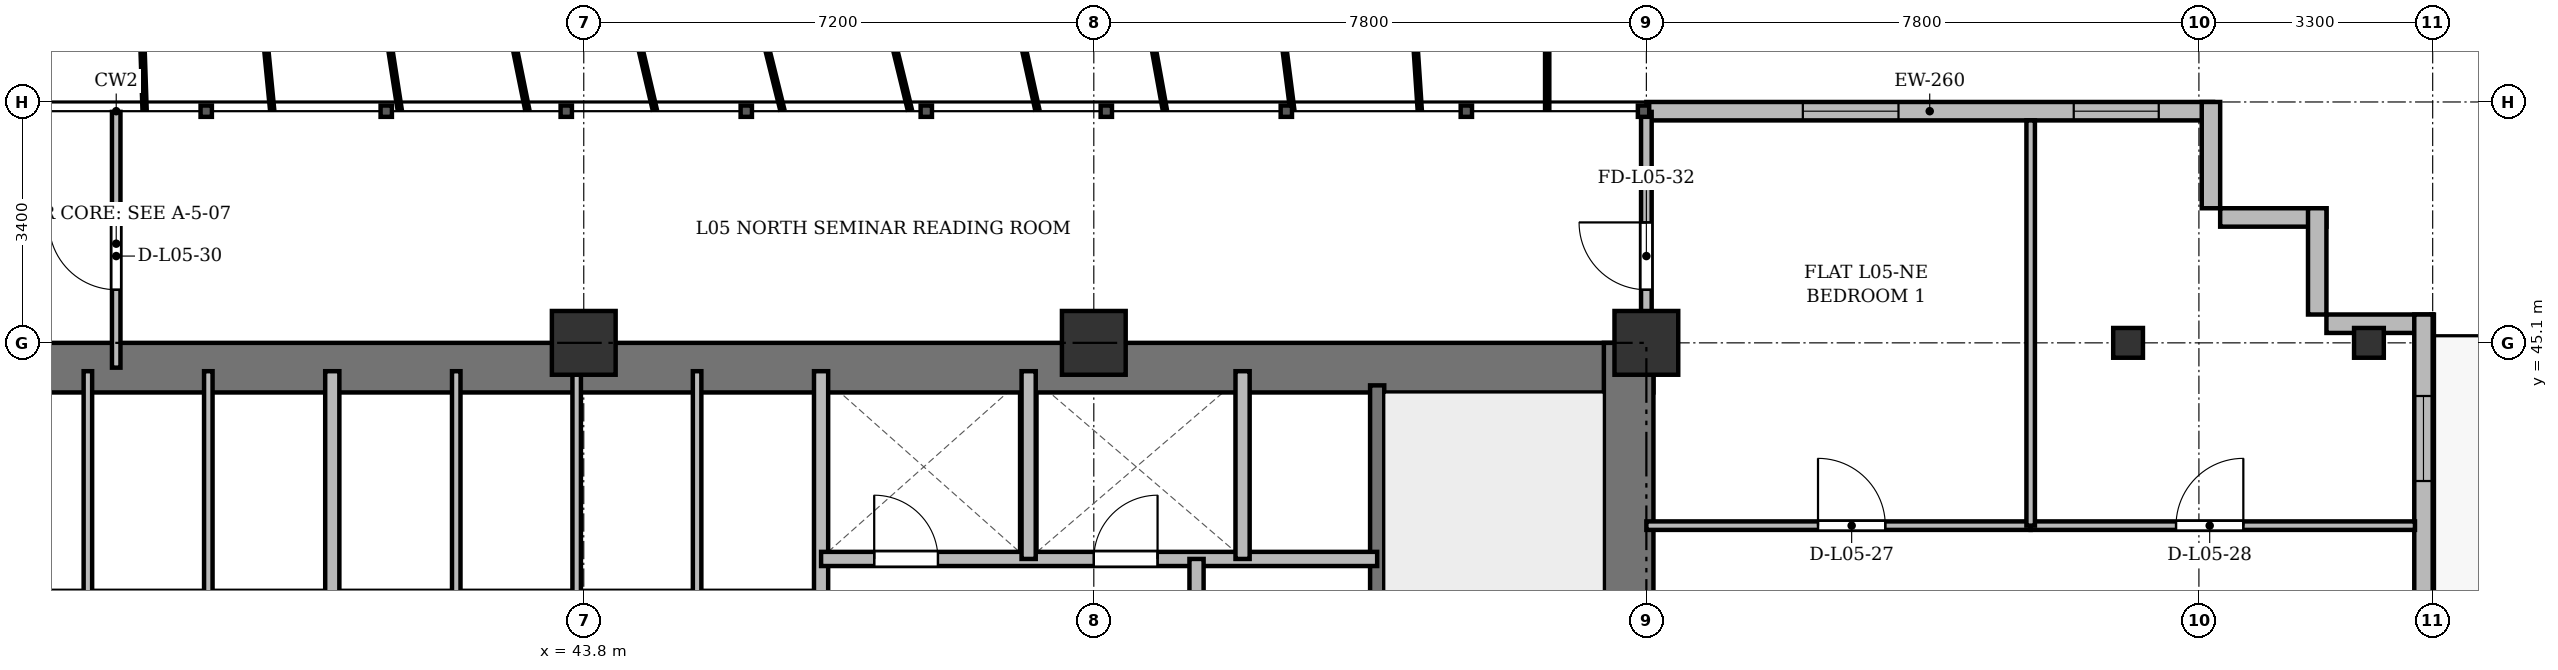
"""IFC4 building model, lengths in metres.
Left out: names, types, materials, properties, quantities, classifications, styles, units other than length and angle.
Written with IfcOpenShell. Run it as: python <this file> out.ifc"""

import sys

from ifc_helpers import new_model, si_unit, direction, frame, frame_2d, origin, origin_2d, place, context, subcontext, project, spatial, rectangle, i_section, extrude, source, transform, mapped, element, fill, save


model = new_model("IFC4")
c1 = context("Model", 3, precision=1e-05, world=origin(), true_north=direction((0.0, 1.0)))
c2 = subcontext(c1, "Body", "Model", "MODEL_VIEW")
j1 = project(units=[si_unit("LENGTHUNIT", "METRE"), si_unit("PLANEANGLEUNIT", "RADIAN")], contexts=[c1])
p1 = place(None, origin())
s1 = spatial("IfcSite", under=j1, at=p1, CompositionType="ELEMENT")
p2 = place(p1, origin())
s2 = spatial("IfcBuilding", under=s1, at=p2, CompositionType="ELEMENT")
p3 = place(p2, frame((0.0, 0.0, 23.5)))
s3 = spatial("IfcBuildingStorey", under=s2, at=p3, CompositionType="ELEMENT", Elevation=23.5)
m1 = source(origin(), c2, "Body", "SweptSolid", [
    extrude(rectangle(XDim=0.9, YDim=0.9, at=origin_2d()), origin(), (0.0, 0.0, 1.0), 3.6),
])
for number, where, z_axis, x_axis in (
    (1, (43.8, 45.1, 0.0), (0.0, 0.0, 1.0), (1.0, 0.0, 0.0)),
    (2, (51.0, 45.1, 0.0), (0.0, 0.0, 1.0), (1.0, 0.0, 0.0)),
    (3, (58.8, 45.1, 0.0), (0.0, 0.0, 1.0), (1.0, 0.0, 0.0)),
):
    element("IfcColumn", number, at=place(p3, frame(where, z_axis=z_axis, x_axis=x_axis)), inside=s3, PredefinedType="COLUMN", context=c2, shape_type="MappedRepresentation", body=[
        mapped(m1, transform((0.0, 0.0, 0.0), x_axis=(1.0, 0.0, 0.0), y_axis=(0.0, 1.0, 0.0), z_axis=(0.0, 0.0, 1.0), scale=1.0)),
    ])
m2 = source(origin(), c2, "Body", "SweptSolid", [
    extrude(i_section(OverallWidth=0.42, OverallDepth=0.42, WebThickness=0.026, FlangeThickness=0.04, at=origin_2d()), origin(), (0.0, 0.0, 1.0), 3.6),
])
for number, where, z_axis, x_axis in (
    (4, (65.6, 45.1, 0.0), (0.0, 0.0, 1.0), (1.0, 0.0, 0.0)),
    (5, (69.0, 45.1, 0.0), (0.0, 0.0, 1.0), (1.0, 0.0, 0.0)),
):
    element("IfcColumn", number, at=place(p3, frame(where, z_axis=z_axis, x_axis=x_axis)), inside=s3, PredefinedType="COLUMN", context=c2, shape_type="MappedRepresentation", body=[
        mapped(m2, transform((0.0, 0.0, 0.0), x_axis=(1.0, 0.0, 0.0), y_axis=(0.0, 1.0, 0.0), z_axis=(0.0, 0.0, 1.0), scale=1.0)),
    ])
p4 = place(p3, frame((58.8, 48.37, 0.0), z_axis=(0.0, 0.0, 1.0), x_axis=(1.0, 0.0, 0.0)))
e6 = element("IfcWall", 6, at=p4, inside=s3, PredefinedType="SOLIDWALL", context=c2, shape_type="SweptSolid", body=[
    extrude(rectangle(XDim=8.0, YDim=0.26, at=frame_2d((4.0, 0.0))), origin(), (0.0, 0.0, 1.0), 3.34),
])
p5 = place(p4, frame((2.209, 0.0, 0.9)))
e7 = element("IfcOpeningElement", 7, at=p5, cuts=e6, PredefinedType="OPENING", context=c2, shape_type="SweptSolid", body=[
    extrude(rectangle(XDim=1.35, YDim=1.5, at=frame_2d((0.675, 0.75))), frame((0.0, 0.14, 0.0), z_axis=(0.0, -1.0, 0.0), x_axis=(1.0, 0.0, 0.0)), (0.0, 0.0, 1.0), 0.28),
])
p6 = place(p4, frame((6.033, 0.0, 0.9)))
e8 = element("IfcOpeningElement", 8, at=p6, cuts=e6, PredefinedType="OPENING", context=c2, shape_type="SweptSolid", body=[
    extrude(rectangle(XDim=1.2, YDim=1.65, at=frame_2d((0.6, 0.825))), frame((0.0, 0.14, 0.0), z_axis=(0.0, -1.0, 0.0), x_axis=(1.0, 0.0, 0.0)), (0.0, 0.0, 1.0), 0.28),
])
for number, where, z_axis, x_axis in (
    (9, (66.77, 48.5, 0.0), (0.0, 0.0, 1.0), (0.0, -1.0, 0.0)),
    (10, (66.9, 46.87, 0.0), (0.0, 0.0, 1.0), (1.0, 0.0, 0.0)),
    (11, (68.27, 47.0, 0.0), (0.0, 0.0, 1.0), (0.0, -1.0, 0.0)),
):
    element("IfcWall", number, at=place(p3, frame(where, z_axis=z_axis, x_axis=x_axis)), inside=s3, PredefinedType="SOLIDWALL", context=c2, shape_type="SweptSolid", body=[
        extrude(rectangle(XDim=1.5, YDim=0.26, at=frame_2d((0.75, 0.0))), origin(), (0.0, 0.0, 1.0), 3.34),
    ])
p7 = place(p3, frame((68.4, 45.37, 0.0), z_axis=(0.0, 0.0, 1.0), x_axis=(1.0, 0.0, 0.0)))
e12 = element("IfcWall", 12, at=p7, inside=s3, PredefinedType="SOLIDWALL", context=c2, shape_type="SweptSolid", body=[
    extrude(rectangle(XDim=1.5, YDim=0.26, at=frame_2d((0.75, 0.0))), origin(), (0.0, 0.0, 1.0), 2.69),
])
p8 = place(p3, frame((69.77, 45.5, 0.0), z_axis=(0.0, 0.0, 1.0), x_axis=(0.0, -1.0, 0.0)))
e13 = element("IfcWall", 13, at=p8, inside=s3, PredefinedType="SOLIDWALL", context=c2, shape_type="SweptSolid", body=[
    extrude(rectangle(XDim=39.6, YDim=0.26, at=frame_2d((19.8, 0.0))), origin(), (0.0, 0.0, 1.0), 3.34),
])
p9 = place(p8, frame((9.745, 0.0, 0.0)))
e14 = element("IfcOpeningElement", 14, at=p9, cuts=e13, PredefinedType="OPENING", context=c2, shape_type="SweptSolid", body=[
    extrude(rectangle(XDim=1.2, YDim=2.2, at=frame_2d((0.6, 1.1))), frame((0.0, 0.14, 0.0), z_axis=(0.0, -1.0, 0.0), x_axis=(1.0, 0.0, 0.0)), (0.0, 0.0, 1.0), 0.28),
])
p10 = place(p8, frame((36.95, 0.0, 0.92)))
e15 = element("IfcOpeningElement", 15, at=p10, cuts=e13, PredefinedType="OPENING", context=c2, shape_type="SweptSolid", body=[
    extrude(rectangle(XDim=1.2, YDim=1.65, at=frame_2d((0.6, 0.825))), frame((0.0, 0.14, 0.0), z_axis=(0.0, -1.0, 0.0), x_axis=(1.0, 0.0, 0.0)), (0.0, 0.0, 1.0), 0.28),
])
p11 = place(p8, frame((32.9, 0.0, 0.92)))
e16 = element("IfcOpeningElement", 16, at=p11, cuts=e13, PredefinedType="OPENING", context=c2, shape_type="SweptSolid", body=[
    extrude(rectangle(XDim=2.4, YDim=2.1, at=frame_2d((1.2, 1.05))), frame((0.0, 0.14, 0.0), z_axis=(0.0, -1.0, 0.0), x_axis=(1.0, 0.0, 0.0)), (0.0, 0.0, 1.0), 0.28),
])
p12 = place(p8, frame((28.7, 0.0, 0.92)))
e17 = element("IfcOpeningElement", 17, at=p12, cuts=e13, PredefinedType="OPENING", context=c2, shape_type="SweptSolid", body=[
    extrude(rectangle(XDim=2.4, YDim=2.1, at=frame_2d((1.2, 1.05))), frame((0.0, 0.14, 0.0), z_axis=(0.0, -1.0, 0.0), x_axis=(1.0, 0.0, 0.0)), (0.0, 0.0, 1.0), 0.28),
])
p13 = place(p8, frame((4.5, 0.0, 0.92)))
e18 = element("IfcOpeningElement", 18, at=p13, cuts=e13, PredefinedType="OPENING", context=c2, shape_type="SweptSolid", body=[
    extrude(rectangle(XDim=1.2, YDim=1.65, at=frame_2d((0.6, 0.825))), frame((0.0, 0.14, 0.0), z_axis=(0.0, -1.0, 0.0), x_axis=(1.0, 0.0, 0.0)), (0.0, 0.0, 1.0), 0.28),
])
p14 = place(p8, frame((1.15, 0.0, 0.92)))
e19 = element("IfcOpeningElement", 19, at=p14, cuts=e13, PredefinedType="OPENING", context=c2, shape_type="SweptSolid", body=[
    extrude(rectangle(XDim=1.2, YDim=1.65, at=frame_2d((0.6, 0.825))), frame((0.0, 0.14, 0.0), z_axis=(0.0, -1.0, 0.0), x_axis=(1.0, 0.0, 0.0)), (0.0, 0.0, 1.0), 0.28),
])
p15 = place(p3, frame((15.5, 44.75, 0.0), z_axis=(0.0, 0.0, 1.0), x_axis=(1.0, 0.0, 0.0)))
e20 = element("IfcWall", 20, at=p15, inside=s3, PredefinedType="SHEAR", context=c2, shape_type="SweptSolid", body=[
    extrude(rectangle(XDim=43.4, YDim=0.7, at=frame_2d((21.7, 0.0))), origin(), (0.0, 0.0, 1.0), 3.34),
])
p16 = place(p3, frame((58.55, 33.4, 0.0), z_axis=(0.0, 0.0, 1.0), x_axis=(0.0, 1.0, 0.0)))
e21 = element("IfcWall", 21, at=p16, inside=s3, PredefinedType="SHEAR", context=c2, shape_type="SweptSolid", body=[
    extrude(rectangle(XDim=11.7, YDim=0.7, at=frame_2d((5.85, 0.0))), origin(), (0.0, 0.0, 1.0), 3.34),
])
p17 = place(p3, frame((55.0, 33.4, 0.0), z_axis=(0.0, 0.0, 1.0), x_axis=(0.0, 1.0, 0.0)))
e22 = element("IfcWall", 22, at=p17, inside=s3, PredefinedType="SHEAR", context=c2, shape_type="SweptSolid", body=[
    extrude(rectangle(XDim=11.1, YDim=0.2, at=frame_2d((5.55, 0.0))), origin(), (0.0, 0.0, 1.0), 3.34),
])
p18 = place(p17, frame((0.85, 0.0, 0.0)))
e23 = element("IfcOpeningElement", 23, at=p18, cuts=e22, PredefinedType="OPENING", context=c2, shape_type="SweptSolid", body=[
    extrude(rectangle(XDim=1.1, YDim=2.15, at=frame_2d((0.55, 1.075))), frame((0.0, 0.11, 0.0), z_axis=(0.0, -1.0, 0.0), x_axis=(1.0, 0.0, 0.0)), (0.0, 0.0, 1.0), 0.22),
])
for number, where, z_axis, x_axis in (
    (24, (36.8, 41.5, 0.0), (0.0, 0.0, 1.0), (0.0, 1.0, 0.0)),
    (25, (38.5, 41.5, 0.0), (0.0, 0.0, 1.0), (0.0, 1.0, 0.0)),
):
    element("IfcWall", number, at=place(p3, frame(where, z_axis=z_axis, x_axis=x_axis)), inside=s3, PredefinedType="PARTITIONING", context=c2, shape_type="SweptSolid", body=[
        extrude(rectangle(XDim=3.2, YDim=0.12, at=frame_2d((1.6, 0.0))), origin(), (0.0, 0.0, 1.0), 3.34),
    ])
p19 = place(p3, frame((40.25, 41.5, 0.0), z_axis=(0.0, 0.0, 1.0), x_axis=(0.0, 1.0, 0.0)))
e26 = element("IfcWall", 26, at=p19, inside=s3, PredefinedType="SOLIDWALL", context=c2, shape_type="SweptSolid", body=[
    extrude(rectangle(XDim=3.2, YDim=0.2, at=frame_2d((1.6, 0.0))), origin(), (0.0, 0.0, 1.0), 3.34),
])
p20 = place(p3, frame((42.0, 41.5, 0.0), z_axis=(0.0, 0.0, 1.0), x_axis=(0.0, 1.0, 0.0)))
e27 = element("IfcWall", 27, at=p20, inside=s3, PredefinedType="PARTITIONING", context=c2, shape_type="SweptSolid", body=[
    extrude(rectangle(XDim=3.2, YDim=0.12, at=frame_2d((1.6, 0.0))), origin(), (0.0, 0.0, 1.0), 3.34),
])
p21 = place(p3, frame((43.7, 41.5, 0.0), z_axis=(0.0, 0.0, 1.0), x_axis=(0.0, 1.0, 0.0)))
e28 = element("IfcWall", 28, at=p21, inside=s3, PredefinedType="PARTITIONING", context=c2, shape_type="SweptSolid", body=[
    extrude(rectangle(XDim=3.2, YDim=0.12, at=frame_2d((1.6, 0.0))), origin(), (0.0, 0.0, 1.0), 2.752),
])
p22 = place(p3, frame((45.4, 41.5, 0.0), z_axis=(0.0, 0.0, 1.0), x_axis=(0.0, 1.0, 0.0)))
e29 = element("IfcWall", 29, at=p22, inside=s3, PredefinedType="PARTITIONING", context=c2, shape_type="SweptSolid", body=[
    extrude(rectangle(XDim=3.2, YDim=0.12, at=frame_2d((1.6, 0.0))), origin(), (0.0, 0.0, 1.0), 3.34),
])
p23 = place(p3, frame((47.15, 33.4, 0.0), z_axis=(0.0, 0.0, 1.0), x_axis=(0.0, 1.0, 0.0)))
e30 = element("IfcWall", 30, at=p23, inside=s3, PredefinedType="SOLIDWALL", context=c2, shape_type="SweptSolid", body=[
    extrude(rectangle(XDim=11.3, YDim=0.2, at=frame_2d((5.65, 0.0))), origin(), (0.0, 0.0, 1.0), 2.69),
])
p24 = place(p3, frame((47.15, 42.05, 0.0), z_axis=(0.0, 0.0, 1.0), x_axis=(1.0, 0.0, 0.0)))
e31 = element("IfcWall", 31, at=p24, inside=s3, PredefinedType="SOLIDWALL", context=c2, shape_type="SweptSolid", body=[
    extrude(rectangle(XDim=7.85, YDim=0.2, at=frame_2d((3.925, 0.0))), origin(), (0.0, 0.0, 1.0), 2.752),
])
p25 = place(p24, frame((0.75, 0.0, 0.0)))
e32 = element("IfcOpeningElement", 32, at=p25, cuts=e31, PredefinedType="OPENING", context=c2, shape_type="SweptSolid", body=[
    extrude(rectangle(XDim=0.9, YDim=2.1, at=frame_2d((0.45, 1.05))), frame((0.0, 0.11, 0.0), z_axis=(0.0, -1.0, 0.0), x_axis=(1.0, 0.0, 0.0)), (0.0, 0.0, 1.0), 0.22),
])
p26 = place(p24, frame((3.85, 0.0, 0.0)))
e33 = element("IfcOpeningElement", 33, at=p26, cuts=e31, PredefinedType="OPENING", context=c2, shape_type="SweptSolid", body=[
    extrude(rectangle(XDim=0.9, YDim=2.1, at=frame_2d((0.45, 1.05))), frame((0.0, 0.11, 0.0), z_axis=(0.0, -1.0, 0.0), x_axis=(1.0, 0.0, 0.0)), (0.0, 0.0, 1.0), 0.22),
])
for number, where, z_axis, x_axis in (
    (34, (50.08, 42.05, 0.0), (0.0, 0.0, 1.0), (0.0, 1.0, 0.0)),
    (35, (53.1, 42.05, 0.0), (0.0, 0.0, 1.0), (0.0, 1.0, 0.0)),
):
    element("IfcWall", number, at=place(p3, frame(where, z_axis=z_axis, x_axis=x_axis)), inside=s3, PredefinedType="SOLIDWALL", context=c2, shape_type="SweptSolid", body=[
        extrude(rectangle(XDim=2.65, YDim=0.2, at=frame_2d((1.325, 0.0))), origin(), (0.0, 0.0, 1.0), 3.34),
    ])
p27 = place(p3, frame((52.45, 33.4, 0.0), z_axis=(0.0, 0.0, 1.0), x_axis=(0.0, 1.0, 0.0)))
e36 = element("IfcWall", 36, at=p27, inside=s3, PredefinedType="PARTITIONING", context=c2, shape_type="SweptSolid", body=[
    extrude(rectangle(XDim=8.65, YDim=0.2, at=frame_2d((4.325, 0.0))), origin(), (0.0, 0.0, 1.0), 2.69),
])
p28 = place(p27, frame((6.2, 0.0, 0.0)))
e37 = element("IfcOpeningElement", 37, at=p28, cuts=e36, PredefinedType="OPENING", context=c2, shape_type="SweptSolid", body=[
    extrude(rectangle(XDim=0.95, YDim=2.15, at=frame_2d((0.475, 1.075))), frame((0.0, 0.11, 0.0), z_axis=(0.0, -1.0, 0.0), x_axis=(1.0, 0.0, 0.0)), (0.0, 0.0, 1.0), 0.22),
])
p29 = place(p3, frame((58.8, 42.52, 0.0), z_axis=(0.0, 0.0, 1.0), x_axis=(1.0, 0.0, 0.0)))
e38 = element("IfcWall", 38, at=p29, inside=s3, PredefinedType="PARTITIONING", context=c2, shape_type="SweptSolid", body=[
    extrude(rectangle(XDim=5.425, YDim=0.12, at=frame_2d((2.712, 0.0))), origin(), (0.0, 0.0, 1.0), 2.752),
])
p30 = place(p29, frame((2.423, 0.0, 0.0)))
e39 = element("IfcOpeningElement", 39, at=p30, cuts=e38, PredefinedType="OPENING", context=c2, shape_type="SweptSolid", body=[
    extrude(rectangle(XDim=0.95, YDim=2.15, at=frame_2d((0.475, 1.075))), frame((0.0, 0.07, 0.0), z_axis=(0.0, -1.0, 0.0), x_axis=(1.0, 0.0, 0.0)), (0.0, 0.0, 1.0), 0.14),
])
p31 = place(p3, frame((64.225, 42.52, 0.0), z_axis=(0.0, 0.0, 1.0), x_axis=(1.0, 0.0, 0.0)))
e40 = element("IfcWall", 40, at=p31, inside=s3, PredefinedType="PARTITIONING", context=c2, shape_type="SweptSolid", body=[
    extrude(rectangle(XDim=5.425, YDim=0.12, at=frame_2d((2.712, 0.0))), origin(), (0.0, 0.0, 1.0), 2.752),
])
p32 = place(p31, frame((2.052, 0.0, 0.0)))
e41 = element("IfcOpeningElement", 41, at=p32, cuts=e40, PredefinedType="OPENING", context=c2, shape_type="SweptSolid", body=[
    extrude(rectangle(XDim=0.95, YDim=2.15, at=frame_2d((0.475, 1.075))), frame((0.0, 0.07, 0.0), z_axis=(0.0, -1.0, 0.0), x_axis=(1.0, 0.0, 0.0)), (0.0, 0.0, 1.0), 0.14),
])
p33 = place(p3, frame((64.225, 42.52, 0.0), z_axis=(0.0, 0.0, 1.0), x_axis=(0.0, 1.0, 0.0)))
e42 = element("IfcWall", 42, at=p33, inside=s3, PredefinedType="PARTITIONING", context=c2, shape_type="SweptSolid", body=[
    extrude(rectangle(XDim=5.72, YDim=0.12, at=frame_2d((2.86, 0.0))), origin(), (0.0, 0.0, 1.0), 2.69),
])
p34 = place(p3, frame((37.2, 44.75, 0.0), z_axis=(0.0, 0.0, 1.0), x_axis=(0.0, 1.0, 0.0)))
e43 = element("IfcWall", 43, at=p34, inside=s3, PredefinedType="PARTITIONING", context=c2, shape_type="SweptSolid", body=[
    extrude(rectangle(XDim=3.61, YDim=0.12, at=frame_2d((1.805, 0.0))), origin(), (0.0, 0.0, 1.0), 2.69),
])
p35 = place(p34, frame((1.1, 0.0, 0.0)))
e44 = element("IfcOpeningElement", 44, at=p35, cuts=e43, PredefinedType="OPENING", context=c2, shape_type="SweptSolid", body=[
    extrude(rectangle(XDim=0.95, YDim=2.15, at=frame_2d((0.475, 1.075))), frame((0.0, 0.07, 0.0), z_axis=(0.0, -1.0, 0.0), x_axis=(1.0, 0.0, 0.0)), (0.0, 0.0, 1.0), 0.14),
])
p36 = place(p3, frame((58.8, 44.75, 0.0), z_axis=(0.0, 0.0, 1.0), x_axis=(0.0, 1.0, 0.0)))
e45 = element("IfcWall", 45, at=p36, inside=s3, PredefinedType="PARTITIONING", context=c2, shape_type="SweptSolid", body=[
    extrude(rectangle(XDim=3.61, YDim=0.15, at=frame_2d((1.805, 0.0))), origin(), (0.0, 0.0, 1.0), 2.752),
])
p37 = place(p36, frame((1.1, 0.0, 0.0)))
e46 = element("IfcOpeningElement", 46, at=p37, cuts=e45, PredefinedType="OPENING", context=c2, shape_type="SweptSolid", body=[
    extrude(rectangle(XDim=0.95, YDim=2.15, at=frame_2d((0.475, 1.075))), frame((0.0, 0.085, 0.0), z_axis=(0.0, -1.0, 0.0), x_axis=(1.0, 0.0, 0.0)), (0.0, 0.0, 1.0), 0.17),
])
m3 = source(origin(), c2, "Body", "SweptSolid", [
    extrude(rectangle(XDim=1.35, YDim=1.5, at=frame_2d((0.675, 0.75))), frame((0.0, 0.03, 0.0), z_axis=(0.0, -1.0, 0.0), x_axis=(1.0, 0.0, 0.0)), (0.0, 0.0, 1.0), 0.06),
])
p38 = place(p5, origin())
e47 = element("IfcWindow", 47, at=p38, inside=s3, PartitioningType="SINGLE_PANEL", PredefinedType="WINDOW", context=c2, shape_type="MappedRepresentation", body=[
    mapped(m3, transform((0.0, 0.0, 0.0), x_axis=(1.0, 0.0, 0.0), y_axis=(0.0, 1.0, 0.0), z_axis=(0.0, 0.0, 1.0), scale=1.0)),
])
fill(e7, e47)
m4 = source(origin(), c2, "Body", "SweptSolid", [
    extrude(rectangle(XDim=1.2, YDim=1.65, at=frame_2d((0.6, 0.825))), frame((0.0, 0.03, 0.0), z_axis=(0.0, -1.0, 0.0), x_axis=(1.0, 0.0, 0.0)), (0.0, 0.0, 1.0), 0.06),
])
p39 = place(p6, origin())
e48 = element("IfcWindow", 48, at=p39, inside=s3, PartitioningType="SINGLE_PANEL", PredefinedType="WINDOW", context=c2, shape_type="MappedRepresentation", body=[
    mapped(m4, transform((0.0, 0.0, 0.0), x_axis=(1.0, 0.0, 0.0), y_axis=(0.0, 1.0, 0.0), z_axis=(0.0, 0.0, 1.0), scale=1.0)),
])
fill(e8, e48)
p40 = place(p14, origin())
e49 = element("IfcWindow", 49, at=p40, inside=s3, PartitioningType="SINGLE_PANEL", PredefinedType="WINDOW", context=c2, shape_type="MappedRepresentation", body=[
    mapped(m4, transform((0.0, 0.0, 0.0), x_axis=(1.0, 0.0, 0.0), y_axis=(0.0, 1.0, 0.0), z_axis=(0.0, 0.0, 1.0), scale=1.0)),
])
fill(e19, e49)
m5 = source(origin(), c2, "Body", "SweptSolid", [
    extrude(rectangle(XDim=0.9, YDim=2.1, at=frame_2d((0.45, 1.05))), frame((0.0, 0.025, 0.0), z_axis=(0.0, -1.0, 0.0), x_axis=(1.0, 0.0, 0.0)), (0.0, 0.0, 1.0), 0.05),
])
p41 = place(p25, origin())
e50 = element("IfcDoor", 50, at=p41, inside=s3, OperationType="SINGLE_SWING_LEFT", PredefinedType="DOOR", context=c2, shape_type="MappedRepresentation", body=[
    mapped(m5, transform((0.0, 0.0, 0.0), x_axis=(1.0, 0.0, 0.0), y_axis=(0.0, 1.0, 0.0), z_axis=(0.0, 0.0, 1.0), scale=1.0)),
])
fill(e32, e50)
p42 = place(p26, origin())
e51 = element("IfcDoor", 51, at=p42, inside=s3, OperationType="SINGLE_SWING_RIGHT", PredefinedType="DOOR", context=c2, shape_type="MappedRepresentation", body=[
    mapped(m5, transform((0.0, 0.0, 0.0), x_axis=(1.0, 0.0, 0.0), y_axis=(0.0, 1.0, 0.0), z_axis=(0.0, 0.0, 1.0), scale=1.0)),
])
fill(e33, e51)
m6 = source(origin(), c2, "Body", "SweptSolid", [
    extrude(rectangle(XDim=0.95, YDim=2.15, at=frame_2d((0.475, 1.075))), frame((0.0, 0.025, 0.0), z_axis=(0.0, -1.0, 0.0), x_axis=(1.0, 0.0, 0.0)), (0.0, 0.0, 1.0), 0.05),
])
p43 = place(p30, origin())
e52 = element("IfcDoor", 52, at=p43, inside=s3, OperationType="SINGLE_SWING_LEFT", PredefinedType="DOOR", context=c2, shape_type="MappedRepresentation", body=[
    mapped(m6, transform((0.0, 0.0, 0.0), x_axis=(1.0, 0.0, 0.0), y_axis=(0.0, 1.0, 0.0), z_axis=(0.0, 0.0, 1.0), scale=1.0)),
])
fill(e39, e52)
p44 = place(p32, origin())
e53 = element("IfcDoor", 53, at=p44, inside=s3, OperationType="SINGLE_SWING_RIGHT", PredefinedType="DOOR", context=c2, shape_type="MappedRepresentation", body=[
    mapped(m6, transform((0.0, 0.0, 0.0), x_axis=(1.0, 0.0, 0.0), y_axis=(0.0, 1.0, 0.0), z_axis=(0.0, 0.0, 1.0), scale=1.0)),
])
fill(e41, e53)
p45 = place(p35, origin())
e54 = element("IfcDoor", 54, at=p45, inside=s3, OperationType="SINGLE_SWING_RIGHT", PredefinedType="DOOR", context=c2, shape_type="MappedRepresentation", body=[
    mapped(m6, transform((0.0, 0.0, 0.0), x_axis=(1.0, 0.0, 0.0), y_axis=(0.0, 1.0, 0.0), z_axis=(0.0, 0.0, 1.0), scale=1.0)),
])
fill(e44, e54)
p46 = place(p37, origin())
e55 = element("IfcDoor", 55, at=p46, inside=s3, OperationType="SINGLE_SWING_RIGHT", PredefinedType="DOOR", context=c2, shape_type="MappedRepresentation", body=[
    mapped(m6, transform((0.0, 0.0, 0.0), x_axis=(1.0, 0.0, 0.0), y_axis=(0.0, 1.0, 0.0), z_axis=(0.0, 0.0, 1.0), scale=1.0)),
])
fill(e46, e55)
save(model, sys.argv[1])
